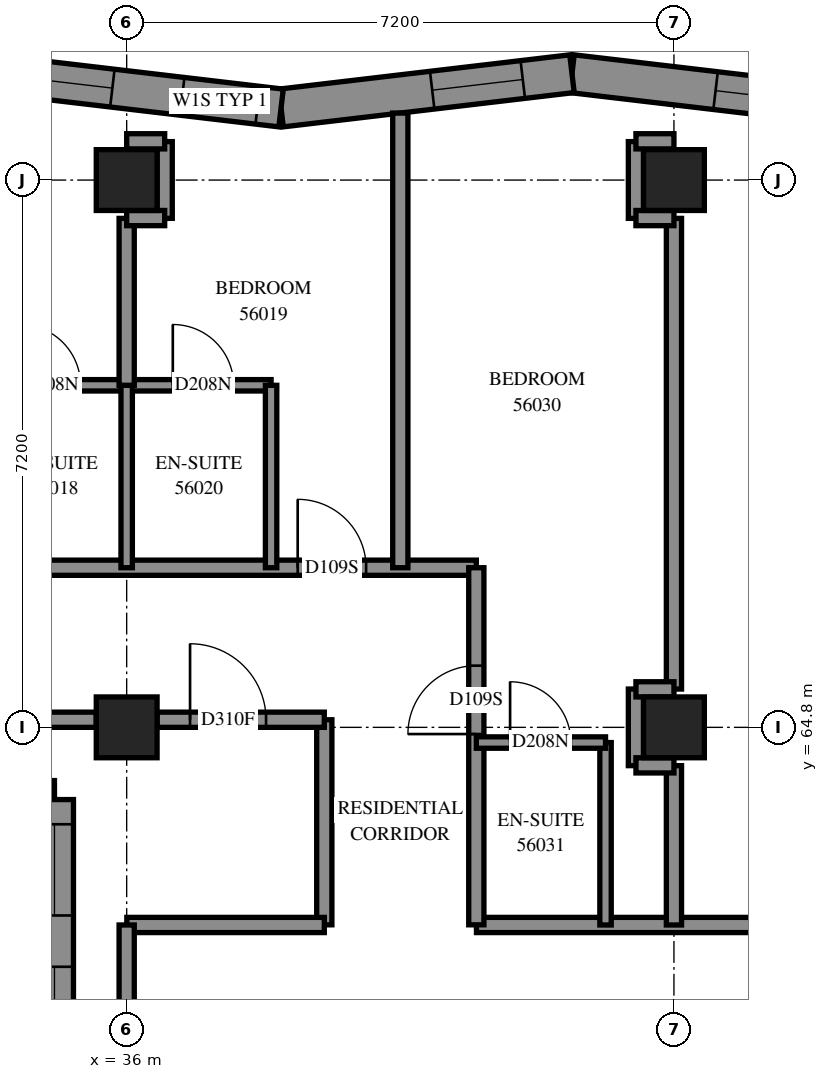
"""IFC4 building model, lengths in metres.
Left out: names, types, materials, properties, quantities, classifications, styles, units other than length and angle.
Written with IfcOpenShell. Run it as: python <this file> out.ifc"""

import sys

from ifc_helpers import new_model, si_unit, direction, frame, frame_2d, origin, origin_2d, place, context, subcontext, project, spatial, polyline, rectangle, outline, extrude, element, fill, save


model = new_model("IFC4")
c1 = context("Model", 3, precision=1e-05, world=origin(), true_north=direction((0.0, 1.0)))
c2 = subcontext(c1, "Body", "Model", "MODEL_VIEW")
j1 = project(units=[si_unit("LENGTHUNIT", "METRE"), si_unit("PLANEANGLEUNIT", "RADIAN")], contexts=[c1])
p1 = place(None, origin())
s1 = spatial("IfcSite", under=j1, at=p1, CompositionType="ELEMENT")
p2 = place(p1, origin())
s2 = spatial("IfcBuilding", under=s1, at=p2, CompositionType="ELEMENT")
p3 = place(p2, frame((0.0, 0.0, 206.6)))
s3 = spatial("IfcBuildingStorey", under=s2, at=p3, CompositionType="ELEMENT", Elevation=206.6)
for number, where, z_axis, x_axis in (
    (1, (36.0, 64.8, 0.0), (0.0, 0.0, 1.0), (1.0, 0.0, 0.0)),
    (2, (36.0, 72.0, 0.0), (0.0, 0.0, 1.0), (1.0, 0.0, 0.0)),
    (3, (43.2, 64.8, 0.0), (0.0, 0.0, 1.0), (1.0, 0.0, 0.0)),
    (4, (43.2, 72.0, 0.0), (0.0, 0.0, 1.0), (1.0, 0.0, 0.0)),
):
    element("IfcColumn", number, at=place(p3, frame(where, z_axis=z_axis, x_axis=x_axis)), inside=s3, PredefinedType="COLUMN", context=c2, shape_type="SweptSolid", body=[
        extrude(rectangle(XDim=0.8, YDim=0.8, at=origin_2d()), origin(), (0.0, 0.0, 1.0), 3.1),
    ])
p4 = place(p3, frame((45.686, 72.948, 0.0), z_axis=(0.0, 0.0, 1.0), x_axis=(-0.9931286235, 0.1170279333, 0.0)))
e5 = element("IfcWall", 5, at=p4, inside=s3, PredefinedType="SOLIDWALL", context=c2, shape_type="SweptSolid", body=[
    extrude(outline(polyline([(0.029, -0.25), (3.883, -0.25), (3.824, 0.25), (-0.029, 0.25), (0.029, -0.25)])), origin(), (0.0, 0.0, 1.0), 3.1),
])
p5 = place(p4, frame((0.752, 0.0, 0.45)))
e6 = element("IfcOpeningElement", 6, at=p5, cuts=e5, PredefinedType="OPENING", context=c2, shape_type="SweptSolid", body=[
    extrude(rectangle(XDim=1.2, YDim=2.5, at=frame_2d((0.6, 1.25))), frame((0.0, 0.26, 0.0), z_axis=(0.0, -1.0, 0.0), x_axis=(1.0, 0.0, 0.0)), (0.0, 0.0, 1.0), 0.52),
])
p6 = place(p3, frame((41.859, 73.399, 0.0), z_axis=(0.0, 0.0, 1.0), x_axis=(-0.9931289789, -0.1170249176, 0.0)))
e7 = element("IfcWall", 7, at=p6, inside=s3, PredefinedType="SOLIDWALL", context=c2, shape_type="SweptSolid", body=[
    extrude(outline(polyline([(-0.029, -0.25), (3.824, -0.25), (3.883, 0.25), (0.029, 0.25), (-0.029, -0.25)])), origin(), (0.0, 0.0, 1.0), 3.1),
])
p7 = place(p6, frame((0.652, 0.0, 0.45)))
e8 = element("IfcOpeningElement", 8, at=p7, cuts=e7, PredefinedType="OPENING", context=c2, shape_type="SweptSolid", body=[
    extrude(rectangle(XDim=1.2, YDim=2.5, at=frame_2d((0.6, 1.25))), frame((0.0, 0.26, 0.0), z_axis=(0.0, -1.0, 0.0), x_axis=(1.0, 0.0, 0.0)), (0.0, 0.0, 1.0), 0.52),
])
p8 = place(p3, frame((38.031, 72.948, 0.0), z_axis=(0.0, 0.0, 1.0), x_axis=(-0.9931289789, 0.1170249176, 0.0)))
e9 = element("IfcWall", 9, at=p8, inside=s3, PredefinedType="SOLIDWALL", context=c2, shape_type="SweptSolid", body=[
    extrude(outline(polyline([(0.029, -0.25), (3.883, -0.25), (3.824, 0.25), (-0.029, 0.25), (0.029, -0.25)])), origin(), (0.0, 0.0, 1.0), 3.1),
])
p9 = place(p8, frame((2.235, 0.0, 0.45)))
e10 = element("IfcOpeningElement", 10, at=p9, cuts=e9, PredefinedType="OPENING", context=c2, shape_type="SweptSolid", body=[
    extrude(rectangle(XDim=1.2, YDim=2.5, at=frame_2d((0.6, 1.25))), frame((0.0, 0.26, 0.0), z_axis=(0.0, -1.0, 0.0), x_axis=(1.0, 0.0, 0.0)), (0.0, 0.0, 1.0), 0.52),
])
p10 = place(p8, frame((0.309, 0.0, 0.45)))
e11 = element("IfcOpeningElement", 11, at=p10, cuts=e9, PredefinedType="OPENING", context=c2, shape_type="SweptSolid", body=[
    extrude(rectangle(XDim=1.0, YDim=2.5, at=frame_2d((0.5, 1.25))), frame((0.0, 0.26, 0.0), z_axis=(0.0, -1.0, 0.0), x_axis=(1.0, 0.0, 0.0)), (0.0, 0.0, 1.0), 0.52),
])
p11 = place(p3, frame((26.799, 63.85, 0.0), z_axis=(0.0, 0.0, 1.0), x_axis=(1.0, 0.0, 0.0)))
e12 = element("IfcWall", 12, at=p11, inside=s3, PredefinedType="SOLIDWALL", context=c2, shape_type="SweptSolid", body=[
    extrude(outline(polyline([(-0.25, -0.25), (8.001, -0.25), (8.501, 0.25), (0.25, 0.25), (-0.25, -0.25)])), origin(), (0.0, 0.0, 1.0), 3.1),
])
p12 = place(p11, frame((2.151, 0.0, 0.45)))
e13 = element("IfcOpeningElement", 13, at=p12, cuts=e12, PredefinedType="OPENING", context=c2, shape_type="SweptSolid", body=[
    extrude(rectangle(XDim=1.3, YDim=2.5, at=frame_2d((0.65, 1.25))), frame((0.0, 0.26, 0.0), z_axis=(0.0, -1.0, 0.0), x_axis=(1.0, 0.0, 0.0)), (0.0, 0.0, 1.0), 0.52),
])
p13 = place(p11, frame((3.651, 0.0, 0.45)))
e14 = element("IfcOpeningElement", 14, at=p13, cuts=e12, PredefinedType="OPENING", context=c2, shape_type="SweptSolid", body=[
    extrude(rectangle(XDim=1.3, YDim=2.5, at=frame_2d((0.65, 1.25))), frame((0.0, 0.26, 0.0), z_axis=(0.0, -1.0, 0.0), x_axis=(1.0, 0.0, 0.0)), (0.0, 0.0, 1.0), 0.52),
])
p14 = place(p11, frame((0.625, 0.0, 0.45)))
e15 = element("IfcOpeningElement", 15, at=p14, cuts=e12, PredefinedType="OPENING", context=c2, shape_type="SweptSolid", body=[
    extrude(rectangle(XDim=1.2, YDim=2.5, at=frame_2d((0.6, 1.25))), frame((0.0, 0.26, 0.0), z_axis=(0.0, -1.0, 0.0), x_axis=(1.0, 0.0, 0.0)), (0.0, 0.0, 1.0), 0.52),
])
p15 = place(p11, frame((6.226, 0.0, 0.45)))
e16 = element("IfcOpeningElement", 16, at=p15, cuts=e12, PredefinedType="OPENING", context=c2, shape_type="SweptSolid", body=[
    extrude(rectangle(XDim=1.2, YDim=2.5, at=frame_2d((0.6, 1.25))), frame((0.0, 0.26, 0.0), z_axis=(0.0, -1.0, 0.0), x_axis=(1.0, 0.0, 0.0)), (0.0, 0.0, 1.0), 0.52),
])
p16 = place(p3, frame((35.05, 63.85, 0.0), z_axis=(0.0, 0.0, 1.0), x_axis=(0.0, -1.0, 0.0)))
e17 = element("IfcWall", 17, at=p16, inside=s3, PredefinedType="SOLIDWALL", context=c2, shape_type="SweptSolid", body=[
    extrude(outline(polyline([(0.25, -0.25), (7.45, -0.25), (6.95, 0.25), (-0.25, 0.25), (0.25, -0.25)])), origin(), (0.0, 0.0, 1.0), 3.1),
])
p17 = place(p16, frame((2.2, 0.0, 0.45)))
e18 = element("IfcOpeningElement", 18, at=p17, cuts=e17, PredefinedType="OPENING", context=c2, shape_type="SweptSolid", body=[
    extrude(rectangle(XDim=1.3, YDim=2.5, at=frame_2d((0.65, 1.25))), frame((0.0, 0.26, 0.0), z_axis=(0.0, -1.0, 0.0), x_axis=(1.0, 0.0, 0.0)), (0.0, 0.0, 1.0), 0.52),
])
p18 = place(p16, frame((4.55, 0.0, 0.45)))
e19 = element("IfcOpeningElement", 19, at=p18, cuts=e17, PredefinedType="OPENING", context=c2, shape_type="SweptSolid", body=[
    extrude(rectangle(XDim=1.3, YDim=2.5, at=frame_2d((0.65, 1.25))), frame((0.0, 0.26, 0.0), z_axis=(0.0, -1.0, 0.0), x_axis=(1.0, 0.0, 0.0)), (0.0, 0.0, 1.0), 0.52),
])
p19 = place(p16, frame((0.325, 0.0, 0.45)))
e20 = element("IfcOpeningElement", 20, at=p19, cuts=e17, PredefinedType="OPENING", context=c2, shape_type="SweptSolid", body=[
    extrude(rectangle(XDim=1.2, YDim=2.5, at=frame_2d((0.6, 1.25))), frame((0.0, 0.26, 0.0), z_axis=(0.0, -1.0, 0.0), x_axis=(1.0, 0.0, 0.0)), (0.0, 0.0, 1.0), 0.52),
])
p20 = place(p3, frame((40.602, 62.2, 0.0), z_axis=(0.0, 0.0, 1.0), x_axis=(1.0, 0.0, 0.0)))
e21 = element("IfcWall", 21, at=p20, inside=s3, PredefinedType="PARTITIONING", context=c2, shape_type="SweptSolid", body=[
    extrude(rectangle(XDim=14.998, YDim=0.2, at=frame_2d((7.499, 0.0))), origin(), (0.0, 0.0, 1.0), 3.1),
])
p21 = place(p20, frame((6.308, 0.0, 0.0)))
e22 = element("IfcOpeningElement", 22, at=p21, cuts=e21, PredefinedType="OPENING", context=c2, shape_type="SweptSolid", body=[
    extrude(rectangle(XDim=1.0, YDim=2.1, at=frame_2d((0.5, 1.05))), frame((0.0, 0.11, 0.0), z_axis=(0.0, -1.0, 0.0), x_axis=(1.0, 0.0, 0.0)), (0.0, 0.0, 1.0), 0.22),
])
p22 = place(p20, frame((9.928, 0.0, 0.0)))
e23 = element("IfcOpeningElement", 23, at=p22, cuts=e21, PredefinedType="OPENING", context=c2, shape_type="SweptSolid", body=[
    extrude(rectangle(XDim=0.9, YDim=2.1, at=frame_2d((0.45, 1.05))), frame((0.0, 0.11, 0.0), z_axis=(0.0, -1.0, 0.0), x_axis=(1.0, 0.0, 0.0)), (0.0, 0.0, 1.0), 0.22),
])
p23 = place(p20, frame((13.746, 0.0, 0.0)))
e24 = element("IfcOpeningElement", 24, at=p23, cuts=e21, PredefinedType="OPENING", context=c2, shape_type="SweptSolid", body=[
    extrude(rectangle(XDim=1.0, YDim=2.1, at=frame_2d((0.5, 1.05))), frame((0.0, 0.11, 0.0), z_axis=(0.0, -1.0, 0.0), x_axis=(1.0, 0.0, 0.0)), (0.0, 0.0, 1.0), 0.22),
])
p24 = place(p3, frame((28.802, 66.9, 0.0), z_axis=(0.0, 0.0, 1.0), x_axis=(1.0, 0.0, 0.0)))
e25 = element("IfcWall", 25, at=p24, inside=s3, PredefinedType="PARTITIONING", context=c2, shape_type="SweptSolid", body=[
    extrude(rectangle(XDim=11.798, YDim=0.2, at=frame_2d((5.899, 0.0))), origin(), (0.0, 0.0, 1.0), 3.1),
])
p25 = place(p24, frame((1.805, 0.0, 0.0)))
e26 = element("IfcOpeningElement", 26, at=p25, cuts=e25, PredefinedType="OPENING", context=c2, shape_type="SweptSolid", body=[
    extrude(rectangle(XDim=1.0, YDim=2.1, at=frame_2d((0.5, 1.05))), frame((0.0, 0.11, 0.0), z_axis=(0.0, -1.0, 0.0), x_axis=(1.0, 0.0, 0.0)), (0.0, 0.0, 1.0), 0.22),
])
p26 = place(p24, frame((3.998, 0.0, 0.0)))
e27 = element("IfcOpeningElement", 27, at=p26, cuts=e25, PredefinedType="OPENING", context=c2, shape_type="SweptSolid", body=[
    extrude(rectangle(XDim=0.9, YDim=2.1, at=frame_2d((0.45, 1.05))), frame((0.0, 0.11, 0.0), z_axis=(0.0, -1.0, 0.0), x_axis=(1.0, 0.0, 0.0)), (0.0, 0.0, 1.0), 0.22),
])
p27 = place(p24, frame((9.448, 0.0, 0.0)))
e28 = element("IfcOpeningElement", 28, at=p27, cuts=e25, PredefinedType="OPENING", context=c2, shape_type="SweptSolid", body=[
    extrude(rectangle(XDim=0.9, YDim=2.1, at=frame_2d((0.45, 1.05))), frame((0.0, 0.11, 0.0), z_axis=(0.0, -1.0, 0.0), x_axis=(1.0, 0.0, 0.0)), (0.0, 0.0, 1.0), 0.22),
])
p28 = place(p3, frame((29.2, 64.9, 0.0), z_axis=(0.0, 0.0, 1.0), x_axis=(1.0, 0.0, 0.0)))
e29 = element("IfcWall", 29, at=p28, inside=s3, PredefinedType="PARTITIONING", context=c2, shape_type="SweptSolid", body=[
    extrude(rectangle(XDim=6.4, YDim=0.2, at=frame_2d((3.2, 0.0))), origin(), (0.0, 0.0, 1.0), 2.6),
])
p29 = place(p3, frame((43.2, 65.304, 0.0), z_axis=(0.0, 0.0, 1.0), x_axis=(0.0, 1.0, 0.0)))
e30 = element("IfcWall", 30, at=p29, inside=s3, PredefinedType="PARTITIONING", context=c2, shape_type="SweptSolid", body=[
    extrude(rectangle(XDim=6.192, YDim=0.2, at=frame_2d((3.096, 0.0))), origin(), (0.0, 0.0, 1.0), 3.1),
])
p30 = place(p3, frame((39.6, 66.9, 0.0), z_axis=(0.0, 0.0, 1.0), x_axis=(0.0, 1.0, 0.0)))
e31 = element("IfcWall", 31, at=p30, inside=s3, PredefinedType="PARTITIONING", context=c2, shape_type="SweptSolid", body=[
    extrude(rectangle(XDim=5.981, YDim=0.2, at=frame_2d((2.991, 0.0))), origin(), (0.0, 0.0, 1.0), 3.1),
])
p31 = place(p3, frame((40.6, 62.202, 0.0), z_axis=(0.0, 0.0, 1.0), x_axis=(0.0, 1.0, 0.0)))
e32 = element("IfcWall", 32, at=p31, inside=s3, PredefinedType="PARTITIONING", context=c2, shape_type="SweptSolid", body=[
    extrude(rectangle(XDim=4.698, YDim=0.2, at=frame_2d((2.349, 0.0))), origin(), (0.0, 0.0, 1.0), 3.1),
])
p32 = place(p31, frame((2.51, 0.0, 0.0)))
e33 = element("IfcOpeningElement", 33, at=p32, cuts=e32, PredefinedType="OPENING", context=c2, shape_type="SweptSolid", body=[
    extrude(rectangle(XDim=0.9, YDim=2.1, at=frame_2d((0.45, 1.05))), frame((0.0, 0.11, 0.0), z_axis=(0.0, -1.0, 0.0), x_axis=(1.0, 0.0, 0.0)), (0.0, 0.0, 1.0), 0.22),
])
p33 = place(p3, frame((34.1, 69.3, 0.0), z_axis=(0.0, 0.0, 1.0), x_axis=(1.0, 0.0, 0.0)))
e34 = element("IfcWall", 34, at=p33, inside=s3, PredefinedType="PARTITIONING", context=c2, shape_type="SweptSolid", body=[
    extrude(rectangle(XDim=3.8, YDim=0.15, at=frame_2d((1.9, 0.0))), origin(), (0.0, 0.0, 1.0), 3.1),
])
p34 = place(p33, frame((0.493, 0.0, 0.0)))
e35 = element("IfcOpeningElement", 35, at=p34, cuts=e34, PredefinedType="OPENING", context=c2, shape_type="SweptSolid", body=[
    extrude(rectangle(XDim=0.8, YDim=2.1, at=frame_2d((0.4, 1.05))), frame((0.0, 0.085, 0.0), z_axis=(0.0, -1.0, 0.0), x_axis=(1.0, 0.0, 0.0)), (0.0, 0.0, 1.0), 0.17),
])
p35 = place(p33, frame((2.507, 0.0, 0.0)))
e36 = element("IfcOpeningElement", 36, at=p35, cuts=e34, PredefinedType="OPENING", context=c2, shape_type="SweptSolid", body=[
    extrude(rectangle(XDim=0.8, YDim=2.1, at=frame_2d((0.4, 1.05))), frame((0.0, 0.085, 0.0), z_axis=(0.0, -1.0, 0.0), x_axis=(1.0, 0.0, 0.0)), (0.0, 0.0, 1.0), 0.17),
])
p36 = place(p3, frame((38.6, 62.202, 0.0), z_axis=(0.0, 0.0, 1.0), x_axis=(0.0, 1.0, 0.0)))
e37 = element("IfcWall", 37, at=p36, inside=s3, PredefinedType="PARTITIONING", context=c2, shape_type="SweptSolid", body=[
    extrude(rectangle(XDim=2.698, YDim=0.2, at=frame_2d((1.349, 0.0))), origin(), (0.0, 0.0, 1.0), 3.1),
])
p37 = place(p3, frame((36.002, 62.2, 0.0), z_axis=(0.0, 0.0, 1.0), x_axis=(1.0, 0.0, 0.0)))
e38 = element("IfcWall", 38, at=p37, inside=s3, PredefinedType="PARTITIONING", context=c2, shape_type="SweptSolid", body=[
    extrude(rectangle(XDim=2.598, YDim=0.2, at=frame_2d((1.299, 0.0))), origin(), (0.0, 0.0, 1.0), 3.1),
])
for number, where, z_axis, x_axis in (
    (39, (36.0, 66.9, 0.0), (0.0, 0.0, 1.0), (0.0, 1.0, 0.0)),
    (40, (37.9, 66.9, 0.0), (0.0, 0.0, 1.0), (0.0, 1.0, 0.0)),
    (41, (42.3, 62.2, 0.0), (0.0, 0.0, 1.0), (0.0, 1.0, 0.0)),
):
    element("IfcWall", number, at=place(p3, frame(where, z_axis=z_axis, x_axis=x_axis)), inside=s3, PredefinedType="PARTITIONING", context=c2, shape_type="SweptSolid", body=[
        extrude(rectangle(XDim=2.4, YDim=0.15, at=frame_2d((1.2, 0.0))), origin(), (0.0, 0.0, 1.0), 3.1),
    ])
p38 = place(p3, frame((36.4, 64.9, 0.0), z_axis=(0.0, 0.0, 1.0), x_axis=(1.0, 0.0, 0.0)))
e42 = element("IfcWall", 42, at=p38, inside=s3, PredefinedType="PARTITIONING", context=c2, shape_type="SweptSolid", body=[
    extrude(rectangle(XDim=2.2, YDim=0.2, at=frame_2d((1.1, 0.0))), origin(), (0.0, 0.0, 1.0), 3.1),
])
p39 = place(p38, frame((0.434, 0.0, 0.0)))
e43 = element("IfcOpeningElement", 43, at=p39, cuts=e42, PredefinedType="OPENING", context=c2, shape_type="SweptSolid", body=[
    extrude(rectangle(XDim=1.0, YDim=2.1, at=frame_2d((0.5, 1.05))), frame((0.0, 0.11, 0.0), z_axis=(0.0, -1.0, 0.0), x_axis=(1.0, 0.0, 0.0)), (0.0, 0.0, 1.0), 0.22),
])
p40 = place(p3, frame((36.0, 69.3, 0.0), z_axis=(0.0, 0.0, 1.0), x_axis=(0.0, 1.0, 0.0)))
e44 = element("IfcWall", 44, at=p40, inside=s3, PredefinedType="PARTITIONING", context=c2, shape_type="SweptSolid", body=[
    extrude(rectangle(XDim=2.196, YDim=0.2, at=frame_2d((1.098, 0.0))), origin(), (0.0, 0.0, 1.0), 3.1),
])
p41 = place(p3, frame((43.2, 62.2, 0.0), z_axis=(0.0, 0.0, 1.0), x_axis=(0.0, 1.0, 0.0)))
e45 = element("IfcWall", 45, at=p41, inside=s3, PredefinedType="PARTITIONING", context=c2, shape_type="SweptSolid", body=[
    extrude(rectangle(XDim=2.096, YDim=0.2, at=frame_2d((1.048, 0.0))), origin(), (0.0, 0.0, 1.0), 3.1),
])
p42 = place(p3, frame((36.0, 60.2, 0.0), z_axis=(0.0, 0.0, 1.0), x_axis=(0.0, 1.0, 0.0)))
e46 = element("IfcWall", 46, at=p42, inside=s3, PredefinedType="PARTITIONING", context=c2, shape_type="SweptSolid", body=[
    extrude(rectangle(XDim=2.0, YDim=0.2, at=frame_2d((1.0, 0.0))), origin(), (0.0, 0.0, 1.0), 2.6),
])
p43 = place(p3, frame((40.6, 64.6, 0.0), z_axis=(0.0, 0.0, 1.0), x_axis=(1.0, 0.0, 0.0)))
e47 = element("IfcWall", 47, at=p43, inside=s3, PredefinedType="PARTITIONING", context=c2, shape_type="SweptSolid", body=[
    extrude(rectangle(XDim=1.7, YDim=0.15, at=frame_2d((0.85, 0.0))), origin(), (0.0, 0.0, 1.0), 3.1),
])
p44 = place(p43, frame((0.444, 0.0, 0.0)))
e48 = element("IfcOpeningElement", 48, at=p44, cuts=e47, PredefinedType="OPENING", context=c2, shape_type="SweptSolid", body=[
    extrude(rectangle(XDim=0.8, YDim=2.1, at=frame_2d((0.4, 1.05))), frame((0.0, 0.085, 0.0), z_axis=(0.0, -1.0, 0.0), x_axis=(1.0, 0.0, 0.0)), (0.0, 0.0, 1.0), 0.17),
])
for number, where, z_axis, x_axis in (
    (49, (36.5, 71.496, 0.0), (0.0, 0.0, 1.0), (0.0, 1.0, 0.0)),
    (50, (42.7, 71.496, 0.0), (0.0, 0.0, 1.0), (0.0, 1.0, 0.0)),
):
    element("IfcWall", number, at=place(p3, frame(where, z_axis=z_axis, x_axis=x_axis)), inside=s3, PredefinedType="PARTITIONING", context=c2, shape_type="SweptSolid", body=[
        extrude(rectangle(XDim=1.01, YDim=0.2, at=frame_2d((0.505, 0.0))), origin(), (0.0, 0.0, 1.0), 3.1),
    ])
p45 = place(p3, frame((42.7, 64.296, 0.0), z_axis=(0.0, 0.0, 1.0), x_axis=(0.0, 1.0, 0.0)))
e51 = element("IfcWall", 51, at=p45, inside=s3, PredefinedType="PARTITIONING", context=c2, shape_type="SweptSolid", body=[
    extrude(rectangle(XDim=1.008, YDim=0.2, at=frame_2d((0.504, 0.0))), origin(), (0.0, 0.0, 1.0), 3.1),
])
for number, where, z_axis, x_axis in (
    (52, (36.0, 72.51, 0.0), (0.0, 0.0, 1.0), (1.0, 0.0, 0.0)),
    (53, (42.7, 72.51, 0.0), (0.0, 0.0, 1.0), (1.0, 0.0, 0.0)),
    (54, (36.0, 71.5, 0.0), (0.0, 0.0, 1.0), (1.0, 0.0, 0.0)),
    (55, (42.7, 71.5, 0.0), (0.0, 0.0, 1.0), (1.0, 0.0, 0.0)),
    (56, (42.7, 65.3, 0.0), (0.0, 0.0, 1.0), (1.0, 0.0, 0.0)),
    (57, (42.7, 64.3, 0.0), (0.0, 0.0, 1.0), (1.0, 0.0, 0.0)),
):
    element("IfcWall", number, at=place(p3, frame(where, z_axis=z_axis, x_axis=x_axis)), inside=s3, PredefinedType="PARTITIONING", context=c2, shape_type="SweptSolid", body=[
        extrude(rectangle(XDim=0.5, YDim=0.2, at=frame_2d((0.25, 0.0))), origin(), (0.0, 0.0, 1.0), 3.1),
    ])
p46 = place(p5, origin())
e58 = element("IfcWindow", 58, at=p46, inside=s3, PartitioningType="SINGLE_PANEL", PredefinedType="WINDOW", context=c2, shape_type="SweptSolid", body=[
    extrude(rectangle(XDim=1.2, YDim=2.5, at=frame_2d((0.6, 1.25))), frame((0.0, 0.18, 0.0), z_axis=(0.0, -1.0, 0.0), x_axis=(1.0, 0.0, 0.0)), (0.0, 0.0, 1.0), 0.06),
])
fill(e6, e58)
p47 = place(p7, origin())
e59 = element("IfcWindow", 59, at=p47, inside=s3, PartitioningType="SINGLE_PANEL", PredefinedType="WINDOW", context=c2, shape_type="SweptSolid", body=[
    extrude(rectangle(XDim=1.2, YDim=2.5, at=frame_2d((0.6, 1.25))), frame((0.0, 0.18, 0.0), z_axis=(0.0, -1.0, 0.0), x_axis=(1.0, 0.0, 0.0)), (0.0, 0.0, 1.0), 0.06),
])
fill(e8, e59)
p48 = place(p9, origin())
e60 = element("IfcWindow", 60, at=p48, inside=s3, PartitioningType="SINGLE_PANEL", PredefinedType="WINDOW", context=c2, shape_type="SweptSolid", body=[
    extrude(rectangle(XDim=1.2, YDim=2.5, at=frame_2d((0.6, 1.25))), frame((0.0, 0.18, 0.0), z_axis=(0.0, -1.0, 0.0), x_axis=(1.0, 0.0, 0.0)), (0.0, 0.0, 1.0), 0.06),
])
fill(e10, e60)
p49 = place(p17, origin())
e61 = element("IfcWindow", 61, at=p49, inside=s3, PartitioningType="SINGLE_PANEL", PredefinedType="WINDOW", context=c2, shape_type="SweptSolid", body=[
    extrude(rectangle(XDim=1.3, YDim=2.5, at=frame_2d((0.65, 1.25))), frame((0.0, 0.18, 0.0), z_axis=(0.0, -1.0, 0.0), x_axis=(1.0, 0.0, 0.0)), (0.0, 0.0, 1.0), 0.06),
])
fill(e18, e61)
p50 = place(p19, origin())
e62 = element("IfcWindow", 62, at=p50, inside=s3, PartitioningType="SINGLE_PANEL", PredefinedType="WINDOW", context=c2, shape_type="SweptSolid", body=[
    extrude(rectangle(XDim=1.2, YDim=2.5, at=frame_2d((0.6, 1.25))), frame((0.0, 0.18, 0.0), z_axis=(0.0, -1.0, 0.0), x_axis=(1.0, 0.0, 0.0)), (0.0, 0.0, 1.0), 0.06),
])
fill(e20, e62)
p51 = place(p39, origin())
e63 = element("IfcDoor", 63, at=p51, inside=s3, OperationType="SINGLE_SWING_RIGHT", PredefinedType="DOOR", context=c2, shape_type="SweptSolid", body=[
    extrude(rectangle(XDim=1.0, YDim=2.1, at=frame_2d((0.5, 1.05))), frame((0.0, 0.025, 0.0), z_axis=(0.0, -1.0, 0.0), x_axis=(1.0, 0.0, 0.0)), (0.0, 0.0, 1.0), 0.05),
])
fill(e43, e63)
p52 = place(p34, origin())
e64 = element("IfcDoor", 64, at=p52, inside=s3, OperationType="SINGLE_SWING_RIGHT", PredefinedType="DOOR", context=c2, shape_type="SweptSolid", body=[
    extrude(rectangle(XDim=0.8, YDim=2.1, at=frame_2d((0.4, 1.05))), frame((0.0, 0.025, 0.0), z_axis=(0.0, -1.0, 0.0), x_axis=(1.0, 0.0, 0.0)), (0.0, 0.0, 1.0), 0.05),
])
fill(e35, e64)
p53 = place(p27, origin())
e65 = element("IfcDoor", 65, at=p53, inside=s3, OperationType="SINGLE_SWING_RIGHT", PredefinedType="DOOR", context=c2, shape_type="SweptSolid", body=[
    extrude(rectangle(XDim=0.9, YDim=2.1, at=frame_2d((0.45, 1.05))), frame((0.0, 0.025, 0.0), z_axis=(0.0, -1.0, 0.0), x_axis=(1.0, 0.0, 0.0)), (0.0, 0.0, 1.0), 0.05),
])
fill(e28, e65)
p54 = place(p35, origin())
e66 = element("IfcDoor", 66, at=p54, inside=s3, OperationType="SINGLE_SWING_RIGHT", PredefinedType="DOOR", context=c2, shape_type="SweptSolid", body=[
    extrude(rectangle(XDim=0.8, YDim=2.1, at=frame_2d((0.4, 1.05))), frame((0.0, 0.025, 0.0), z_axis=(0.0, -1.0, 0.0), x_axis=(1.0, 0.0, 0.0)), (0.0, 0.0, 1.0), 0.05),
])
fill(e36, e66)
p55 = place(p32, origin())
e67 = element("IfcDoor", 67, at=p55, inside=s3, OperationType="SINGLE_SWING_LEFT", PredefinedType="DOOR", context=c2, shape_type="SweptSolid", body=[
    extrude(rectangle(XDim=0.9, YDim=2.1, at=frame_2d((0.45, 1.05))), frame((0.0, 0.025, 0.0), z_axis=(0.0, -1.0, 0.0), x_axis=(1.0, 0.0, 0.0)), (0.0, 0.0, 1.0), 0.05),
])
fill(e33, e67)
p56 = place(p44, origin())
e68 = element("IfcDoor", 68, at=p56, inside=s3, OperationType="SINGLE_SWING_RIGHT", PredefinedType="DOOR", context=c2, shape_type="SweptSolid", body=[
    extrude(rectangle(XDim=0.8, YDim=2.1, at=frame_2d((0.4, 1.05))), frame((0.0, 0.025, 0.0), z_axis=(0.0, -1.0, 0.0), x_axis=(1.0, 0.0, 0.0)), (0.0, 0.0, 1.0), 0.05),
])
fill(e48, e68)
p57 = place(p10, origin())
e69 = element("IfcWindow", 69, at=p57, inside=s3, PartitioningType="SINGLE_PANEL", PredefinedType="WINDOW", context=c2, shape_type="SweptSolid", body=[
    extrude(rectangle(XDim=1.0, YDim=2.5, at=frame_2d((0.5, 1.25))), frame((0.0, 0.18, 0.0), z_axis=(0.0, -1.0, 0.0), x_axis=(1.0, 0.0, 0.0)), (0.0, 0.0, 1.0), 0.06),
])
fill(e11, e69)
save(model, sys.argv[1])
